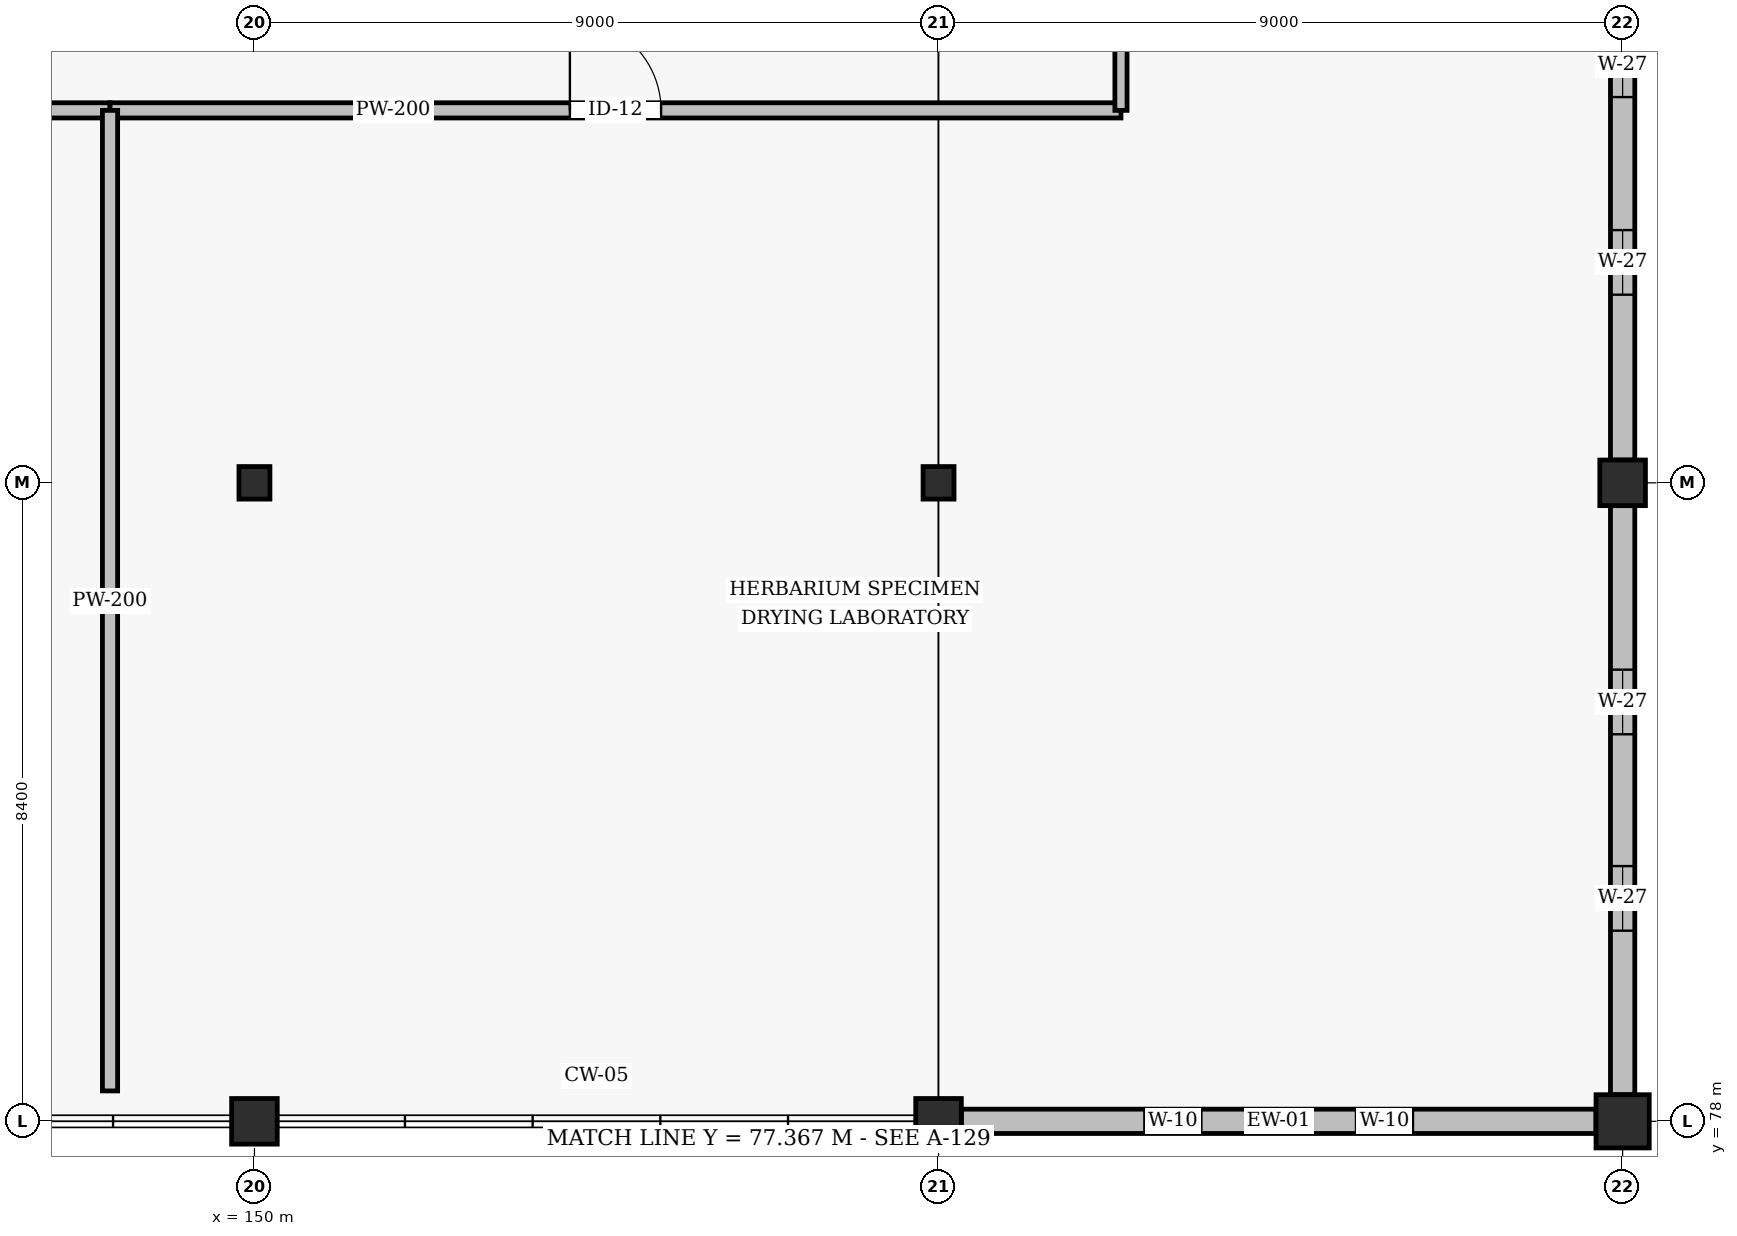
"""IFC4 building model, lengths in metres.
Left out: names, types, materials, properties, quantities, classifications, styles, units other than length and angle.
Written with IfcOpenShell. Run it as: python <this file> out.ifc"""

import sys

from ifc_helpers import new_model, si_unit, direction, frame, frame_2d, origin, origin_2d, place, context, subcontext, project, spatial, rectangle, hollow_rectangle, i_section, extrude, element, fill, save


model = new_model("IFC4")
c1 = context("Model", 3, precision=1e-05, world=origin(), true_north=direction((0.0, 1.0)))
c2 = subcontext(c1, "Body", "Model", "MODEL_VIEW")
j1 = project(units=[si_unit("LENGTHUNIT", "METRE"), si_unit("PLANEANGLEUNIT", "RADIAN")], contexts=[c1])
p1 = place(None, origin())
s1 = spatial("IfcSite", under=j1, at=p1, CompositionType="ELEMENT")
p2 = place(p1, origin())
s2 = spatial("IfcBuilding", under=s1, at=p2, CompositionType="ELEMENT")
p3 = place(p2, frame((0.0, 0.0, 9.0)))
s3 = spatial("IfcBuildingStorey", under=s2, at=p3, CompositionType="ELEMENT", Elevation=9.0)
p4 = place(p3, frame((150.0, 78.0, 0.0), z_axis=(0.0, 0.0, 1.0), x_axis=(1.0, 0.0, 0.0)))
e1 = element("IfcColumn", 1, at=p4, inside=s3, PredefinedType="COLUMN", context=c2, shape_type="SweptSolid", body=[
    extrude(hollow_rectangle(XDim=0.6, YDim=0.6, WallThickness=0.025, InnerFilletRadius=0.025, OuterFilletRadius=0.05, at=origin_2d()), origin(), (0.0, 0.0, 1.0), 4.2),
])
p5 = place(p3, frame((150.0, 86.4, 0.0), z_axis=(0.0, 0.0, 1.0), x_axis=(1.0, 0.0, 0.0)))
e2 = element("IfcColumn", 2, at=p5, inside=s3, PredefinedType="COLUMN", context=c2, shape_type="SweptSolid", body=[
    extrude(i_section(OverallWidth=0.407, OverallDepth=0.428, WebThickness=0.02, FlangeThickness=0.035, FilletRadius=0.022, at=origin_2d()), origin(), (0.0, 0.0, 1.0), 4.2),
])
p6 = place(p3, frame((159.0, 78.0, 0.0), z_axis=(0.0, 0.0, 1.0), x_axis=(1.0, 0.0, 0.0)))
e3 = element("IfcColumn", 3, at=p6, inside=s3, PredefinedType="COLUMN", context=c2, shape_type="SweptSolid", body=[
    extrude(hollow_rectangle(XDim=0.6, YDim=0.6, WallThickness=0.025, InnerFilletRadius=0.025, OuterFilletRadius=0.05, at=origin_2d()), origin(), (0.0, 0.0, 1.0), 4.2),
])
p7 = place(p3, frame((159.0, 86.4, 0.0), z_axis=(0.0, 0.0, 1.0), x_axis=(1.0, 0.0, 0.0)))
e4 = element("IfcColumn", 4, at=p7, inside=s3, PredefinedType="COLUMN", context=c2, shape_type="SweptSolid", body=[
    extrude(i_section(OverallWidth=0.407, OverallDepth=0.428, WebThickness=0.02, FlangeThickness=0.035, FilletRadius=0.022, at=origin_2d()), origin(), (0.0, 0.0, 1.0), 4.2),
])
p8 = place(p3, frame((168.0, 78.0, 0.0), z_axis=(0.0, 0.0, 1.0), x_axis=(1.0, 0.0, 0.0)))
e5 = element("IfcColumn", 5, at=p8, inside=s3, PredefinedType="COLUMN", context=c2, shape_type="SweptSolid", body=[
    extrude(hollow_rectangle(XDim=0.7, YDim=0.7, WallThickness=0.032, InnerFilletRadius=0.032, OuterFilletRadius=0.064, at=origin_2d()), origin(), (0.0, 0.0, 1.0), 4.2),
])
p9 = place(p3, frame((168.0, 86.4, 0.0), z_axis=(0.0, 0.0, 1.0), x_axis=(1.0, 0.0, 0.0)))
e6 = element("IfcColumn", 6, at=p9, inside=s3, PredefinedType="COLUMN", context=c2, shape_type="SweptSolid", body=[
    extrude(hollow_rectangle(XDim=0.6, YDim=0.6, WallThickness=0.025, InnerFilletRadius=0.025, OuterFilletRadius=0.05, at=origin_2d()), origin(), (0.0, 0.0, 1.0), 4.2),
])
p10 = place(p3, frame((159.3, 78.0, 0.0), z_axis=(0.0, 0.0, 1.0), x_axis=(1.0, 0.0, 0.0)))
e7 = element("IfcWall", 7, at=p10, inside=s3, PredefinedType="SOLIDWALL", context=c2, shape_type="SweptSolid", body=[
    extrude(rectangle(XDim=8.35, YDim=0.32, at=frame_2d((4.175, 0.0))), origin(), (0.0, 0.0, 1.0), 3.143),
])
p11 = place(p10, frame((2.408, 0.0, 1.05)))
e8 = element("IfcOpeningElement", 8, at=p11, cuts=e7, PredefinedType="OPENING", context=c2, shape_type="SweptSolid", body=[
    extrude(rectangle(XDim=0.75, YDim=1.6, at=frame_2d((0.375, 0.8))), frame((0.0, 0.17, 0.0), z_axis=(0.0, -1.0, 0.0), x_axis=(1.0, 0.0, 0.0)), (0.0, 0.0, 1.0), 0.34),
])
p12 = place(p10, frame((5.192, 0.0, 1.05)))
e9 = element("IfcOpeningElement", 9, at=p12, cuts=e7, PredefinedType="OPENING", context=c2, shape_type="SweptSolid", body=[
    extrude(rectangle(XDim=0.75, YDim=1.6, at=frame_2d((0.375, 0.8))), frame((0.0, 0.17, 0.0), z_axis=(0.0, -1.0, 0.0), x_axis=(1.0, 0.0, 0.0)), (0.0, 0.0, 1.0), 0.34),
])
p13 = place(p3, frame((168.0, 78.35, 0.0), z_axis=(0.0, 0.0, 1.0), x_axis=(0.0, 1.0, 0.0)))
e10 = element("IfcWall", 10, at=p13, inside=s3, PredefinedType="SOLIDWALL", context=c2, shape_type="SweptSolid", body=[
    extrude(rectangle(XDim=7.75, YDim=0.32, at=frame_2d((3.875, 0.0))), origin(), (0.0, 0.0, 1.0), 3.435),
])
p14 = place(p13, frame((2.158, 0.0, 1.1)))
e11 = element("IfcOpeningElement", 11, at=p14, cuts=e10, PredefinedType="OPENING", context=c2, shape_type="SweptSolid", body=[
    extrude(rectangle(XDim=0.85, YDim=1.45, at=frame_2d((0.425, 0.725))), frame((0.0, 0.17, 0.0), z_axis=(0.0, -1.0, 0.0), x_axis=(1.0, 0.0, 0.0)), (0.0, 0.0, 1.0), 0.34),
])
p15 = place(p13, frame((4.742, 0.0, 1.1)))
e12 = element("IfcOpeningElement", 12, at=p15, cuts=e10, PredefinedType="OPENING", context=c2, shape_type="SweptSolid", body=[
    extrude(rectangle(XDim=0.85, YDim=1.45, at=frame_2d((0.425, 0.725))), frame((0.0, 0.17, 0.0), z_axis=(0.0, -1.0, 0.0), x_axis=(1.0, 0.0, 0.0)), (0.0, 0.0, 1.0), 0.34),
])
p16 = place(p3, frame((168.0, 86.7, 0.0), z_axis=(0.0, 0.0, 1.0), x_axis=(0.0, 1.0, 0.0)))
e13 = element("IfcWall", 13, at=p16, inside=s3, PredefinedType="SOLIDWALL", context=c2, shape_type="SweptSolid", body=[
    extrude(rectangle(XDim=7.8, YDim=0.32, at=frame_2d((3.9, 0.0))), origin(), (0.0, 0.0, 1.0), 3.435),
])
p17 = place(p16, frame((2.175, 0.0, 1.1)))
e14 = element("IfcOpeningElement", 14, at=p17, cuts=e13, PredefinedType="OPENING", context=c2, shape_type="SweptSolid", body=[
    extrude(rectangle(XDim=0.85, YDim=1.45, at=frame_2d((0.425, 0.725))), frame((0.0, 0.17, 0.0), z_axis=(0.0, -1.0, 0.0), x_axis=(1.0, 0.0, 0.0)), (0.0, 0.0, 1.0), 0.34),
])
p18 = place(p16, frame((4.775, 0.0, 1.1)))
e15 = element("IfcOpeningElement", 15, at=p18, cuts=e13, PredefinedType="OPENING", context=c2, shape_type="SweptSolid", body=[
    extrude(rectangle(XDim=0.85, YDim=1.45, at=frame_2d((0.425, 0.725))), frame((0.0, 0.17, 0.0), z_axis=(0.0, -1.0, 0.0), x_axis=(1.0, 0.0, 0.0)), (0.0, 0.0, 1.0), 0.34),
])
p19 = place(p3, frame((116.8, 91.3, 0.0), z_axis=(0.0, 0.0, 1.0), x_axis=(1.0, 0.0, 0.0)))
e16 = element("IfcWall", 16, at=p19, inside=s3, PredefinedType="SOLIDWALL", context=c2, shape_type="SweptSolid", body=[
    extrude(rectangle(XDim=31.3, YDim=0.2, at=frame_2d((15.65, 0.0))), origin(), (0.0, 0.0, 1.0), 3.545),
])
p20 = place(p19, frame((14.95, 0.0, 0.0)))
e17 = element("IfcOpeningElement", 17, at=p20, cuts=e16, PredefinedType="OPENING", context=c2, shape_type="SweptSolid", body=[
    extrude(rectangle(XDim=1.42, YDim=2.18, at=frame_2d((0.71, 1.09))), frame((0.0, 0.11, 0.0), z_axis=(0.0, -1.0, 0.0), x_axis=(1.0, 0.0, 0.0)), (0.0, 0.0, 1.0), 0.22),
])
p21 = place(p3, frame((148.1, 91.3, 0.0), z_axis=(0.0, 0.0, 1.0), x_axis=(1.0, 0.0, 0.0)))
e18 = element("IfcWall", 18, at=p21, inside=s3, PredefinedType="SOLIDWALL", context=c2, shape_type="SweptSolid", body=[
    extrude(rectangle(XDim=13.3, YDim=0.2, at=frame_2d((6.65, 0.0))), origin(), (0.0, 0.0, 1.0), 3.545),
])
p22 = place(p21, frame((6.05, 0.0, 0.0)))
e19 = element("IfcOpeningElement", 19, at=p22, cuts=e18, PredefinedType="OPENING", context=c2, shape_type="SweptSolid", body=[
    extrude(rectangle(XDim=1.2, YDim=2.08, at=frame_2d((0.6, 1.04))), frame((0.0, 0.11, 0.0), z_axis=(0.0, -1.0, 0.0), x_axis=(1.0, 0.0, 0.0)), (0.0, 0.0, 1.0), 0.22),
])
p23 = place(p3, frame((148.1, 78.4, 0.0), z_axis=(0.0, 0.0, 1.0), x_axis=(0.0, 1.0, 0.0)))
e20 = element("IfcWall", 20, at=p23, inside=s3, PredefinedType="SOLIDWALL", context=c2, shape_type="SweptSolid", body=[
    extrude(rectangle(XDim=12.9, YDim=0.2, at=frame_2d((6.45, 0.0))), origin(), (0.0, 0.0, 1.0), 3.385),
])
p24 = place(p3, frame((161.4, 91.3, 0.0), z_axis=(0.0, 0.0, 1.0), x_axis=(0.0, 1.0, 0.0)))
e21 = element("IfcWall", 21, at=p24, inside=s3, PredefinedType="PARTITIONING", context=c2, shape_type="SweptSolid", body=[
    extrude(rectangle(XDim=15.1, YDim=0.16, at=frame_2d((7.55, 0.0))), origin(), (0.0, 0.0, 1.0), 3.285),
])
p25 = place(p24, frame((7.0, 0.0, 0.0)))
e22 = element("IfcOpeningElement", 22, at=p25, cuts=e21, PredefinedType="OPENING", context=c2, shape_type="SweptSolid", body=[
    extrude(rectangle(XDim=1.08, YDim=2.08, at=frame_2d((0.54, 1.04))), frame((0.0, 0.09, 0.0), z_axis=(0.0, -1.0, 0.0), x_axis=(1.0, 0.0, 0.0)), (0.0, 0.0, 1.0), 0.18),
])
p26 = place(p11, origin())
e23 = element("IfcWindow", 23, at=p26, inside=s3, PartitioningType="SINGLE_PANEL", PredefinedType="WINDOW", context=c2, shape_type="SweptSolid", body=[
    extrude(rectangle(XDim=0.75, YDim=1.6, at=frame_2d((0.375, 0.8))), frame((0.0, 0.03, 0.0), z_axis=(0.0, -1.0, 0.0), x_axis=(1.0, 0.0, 0.0)), (0.0, 0.0, 1.0), 0.06),
])
fill(e8, e23)
p27 = place(p12, origin())
e24 = element("IfcWindow", 24, at=p27, inside=s3, PartitioningType="SINGLE_PANEL", PredefinedType="WINDOW", context=c2, shape_type="SweptSolid", body=[
    extrude(rectangle(XDim=0.75, YDim=1.6, at=frame_2d((0.375, 0.8))), frame((0.0, 0.03, 0.0), z_axis=(0.0, -1.0, 0.0), x_axis=(1.0, 0.0, 0.0)), (0.0, 0.0, 1.0), 0.06),
])
fill(e9, e24)
p28 = place(p14, origin())
e25 = element("IfcWindow", 25, at=p28, inside=s3, PartitioningType="SINGLE_PANEL", PredefinedType="WINDOW", context=c2, shape_type="SweptSolid", body=[
    extrude(rectangle(XDim=0.85, YDim=1.45, at=frame_2d((0.425, 0.725))), frame((0.0, 0.03, 0.0), z_axis=(0.0, -1.0, 0.0), x_axis=(1.0, 0.0, 0.0)), (0.0, 0.0, 1.0), 0.06),
])
fill(e11, e25)
p29 = place(p15, origin())
e26 = element("IfcWindow", 26, at=p29, inside=s3, PartitioningType="SINGLE_PANEL", PredefinedType="WINDOW", context=c2, shape_type="SweptSolid", body=[
    extrude(rectangle(XDim=0.85, YDim=1.45, at=frame_2d((0.425, 0.725))), frame((0.0, 0.03, 0.0), z_axis=(0.0, -1.0, 0.0), x_axis=(1.0, 0.0, 0.0)), (0.0, 0.0, 1.0), 0.06),
])
fill(e12, e26)
p30 = place(p17, origin())
e27 = element("IfcWindow", 27, at=p30, inside=s3, PartitioningType="SINGLE_PANEL", PredefinedType="WINDOW", context=c2, shape_type="SweptSolid", body=[
    extrude(rectangle(XDim=0.85, YDim=1.45, at=frame_2d((0.425, 0.725))), frame((0.0, 0.03, 0.0), z_axis=(0.0, -1.0, 0.0), x_axis=(1.0, 0.0, 0.0)), (0.0, 0.0, 1.0), 0.06),
])
fill(e14, e27)
p31 = place(p18, origin())
e28 = element("IfcWindow", 28, at=p31, inside=s3, PartitioningType="SINGLE_PANEL", PredefinedType="WINDOW", context=c2, shape_type="SweptSolid", body=[
    extrude(rectangle(XDim=0.85, YDim=1.45, at=frame_2d((0.425, 0.725))), frame((0.0, 0.03, 0.0), z_axis=(0.0, -1.0, 0.0), x_axis=(1.0, 0.0, 0.0)), (0.0, 0.0, 1.0), 0.06),
])
fill(e15, e28)
p32 = place(p22, origin())
e29 = element("IfcDoor", 29, at=p32, inside=s3, OperationType="SINGLE_SWING_LEFT", PredefinedType="DOOR", context=c2, shape_type="SweptSolid", body=[
    extrude(rectangle(XDim=1.2, YDim=2.08, at=frame_2d((0.6, 1.04))), frame((0.0, 0.025, 0.0), z_axis=(0.0, -1.0, 0.0), x_axis=(1.0, 0.0, 0.0)), (0.0, 0.0, 1.0), 0.05),
])
fill(e19, e29)
save(model, sys.argv[1])
